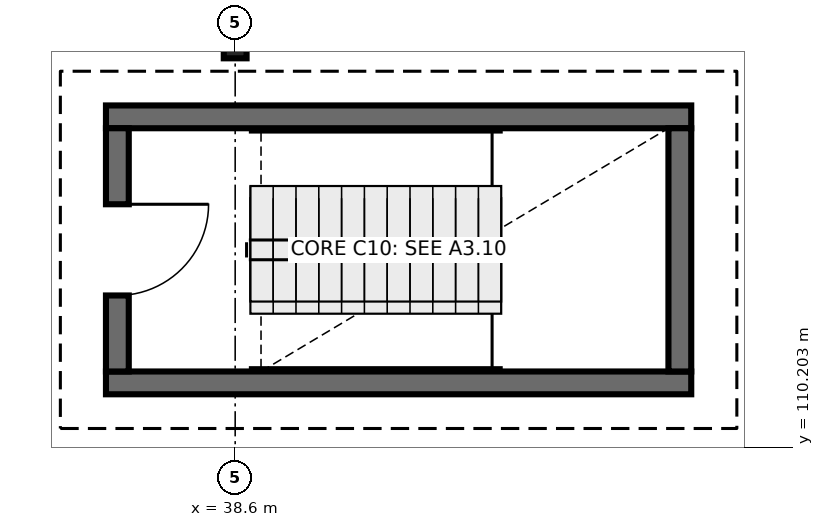
"""IFC4 building model, lengths in metres.
Left out: names, types, materials, properties, quantities, classifications, styles, units other than length and angle.
Written with IfcOpenShell. Run it as: python <this file> out.ifc"""

import sys

from ifc_helpers import new_model, si_unit, direction, frame, frame_2d, origin, origin_2d, place, context, subcontext, project, spatial, rectangle, i_section, extrude, element, fill, save


model = new_model("IFC4")
c1 = context("Model", 3, precision=1e-05, world=origin(), true_north=direction((0.0, 1.0)))
c2 = subcontext(c1, "Body", "Model", "MODEL_VIEW")
j1 = project(units=[si_unit("LENGTHUNIT", "METRE"), si_unit("PLANEANGLEUNIT", "RADIAN")], contexts=[c1])
p1 = place(None, origin())
s1 = spatial("IfcSite", under=j1, at=p1, CompositionType="ELEMENT")
p2 = place(p1, origin())
s2 = spatial("IfcBuilding", under=s1, at=p2, CompositionType="ELEMENT")
p3 = place(p2, frame((0.0, 0.0, 9.3)))
s3 = spatial("IfcBuildingStorey", under=s2, at=p3, CompositionType="ELEMENT", Elevation=9.3)
p4 = place(p3, frame((38.6, 115.5, 0.0), z_axis=(0.0, 0.0, 1.0), x_axis=(1.0, 0.0, 0.0)))
e1 = element("IfcColumn", 1, at=p4, inside=s3, PredefinedType="COLUMN", context=c2, shape_type="SweptSolid", body=[
    extrude(i_section(OverallWidth=0.3, OverallDepth=0.36, WebThickness=0.012, FlangeThickness=0.022, FilletRadius=0.027, at=origin_2d()), origin(), (0.0, 0.0, 1.0), 4.5),
])
for number, where, z_axis, x_axis in (
    (2, (36.9, 111.05, 0.0), (0.0, 0.0, 1.0), (1.0, 0.0, 0.0)),
    (3, (44.6, 114.55, 0.0), (0.0, 0.0, 1.0), (-1.0, 0.0, 0.0)),
):
    element("IfcWall", number, at=place(p3, frame(where, z_axis=z_axis, x_axis=x_axis)), inside=s3, PredefinedType="SHEAR", context=c2, shape_type="SweptSolid", body=[
        extrude(rectangle(XDim=7.7, YDim=0.3, at=frame_2d((3.85, 0.0))), origin(), (0.0, 0.0, 1.0), 4.5),
    ])
p5 = place(p3, frame((37.05, 114.4, 0.0), z_axis=(0.0, 0.0, 1.0), x_axis=(0.0, -1.0, 0.0)))
e4 = element("IfcWall", 4, at=p5, inside=s3, PredefinedType="SHEAR", context=c2, shape_type="SweptSolid", body=[
    extrude(rectangle(XDim=3.2, YDim=0.3, at=frame_2d((1.6, 0.0))), origin(), (0.0, 0.0, 1.0), 4.5),
])
p6 = place(p5, frame((1.0, 0.0, 0.0)))
e5 = element("IfcOpeningElement", 5, at=p6, cuts=e4, PredefinedType="OPENING", context=c2, shape_type="SweptSolid", body=[
    extrude(rectangle(XDim=1.2, YDim=2.15, at=frame_2d((0.6, 1.075))), frame((0.0, 0.16, 0.0), z_axis=(0.0, -1.0, 0.0), x_axis=(1.0, 0.0, 0.0)), (0.0, 0.0, 1.0), 0.32),
])
p7 = place(p3, frame((44.45, 111.2, 0.0), z_axis=(0.0, 0.0, 1.0), x_axis=(0.0, 1.0, 0.0)))
e6 = element("IfcWall", 6, at=p7, inside=s3, PredefinedType="SHEAR", context=c2, shape_type="SweptSolid", body=[
    extrude(rectangle(XDim=3.2, YDim=0.3, at=frame_2d((1.6, 0.0))), origin(), (0.0, 0.0, 1.0), 4.5),
])
p8 = place(p6, origin())
e7 = element("IfcDoor", 7, at=p8, inside=s3, OperationType="SINGLE_SWING_LEFT", PredefinedType="DOOR", context=c2, shape_type="SweptSolid", body=[
    extrude(rectangle(XDim=1.2, YDim=2.15, at=frame_2d((0.6, 1.075))), frame((0.0, 0.025, 0.0), z_axis=(0.0, -1.0, 0.0), x_axis=(1.0, 0.0, 0.0)), (0.0, 0.0, 1.0), 0.05),
])
fill(e5, e7)
save(model, sys.argv[1])
